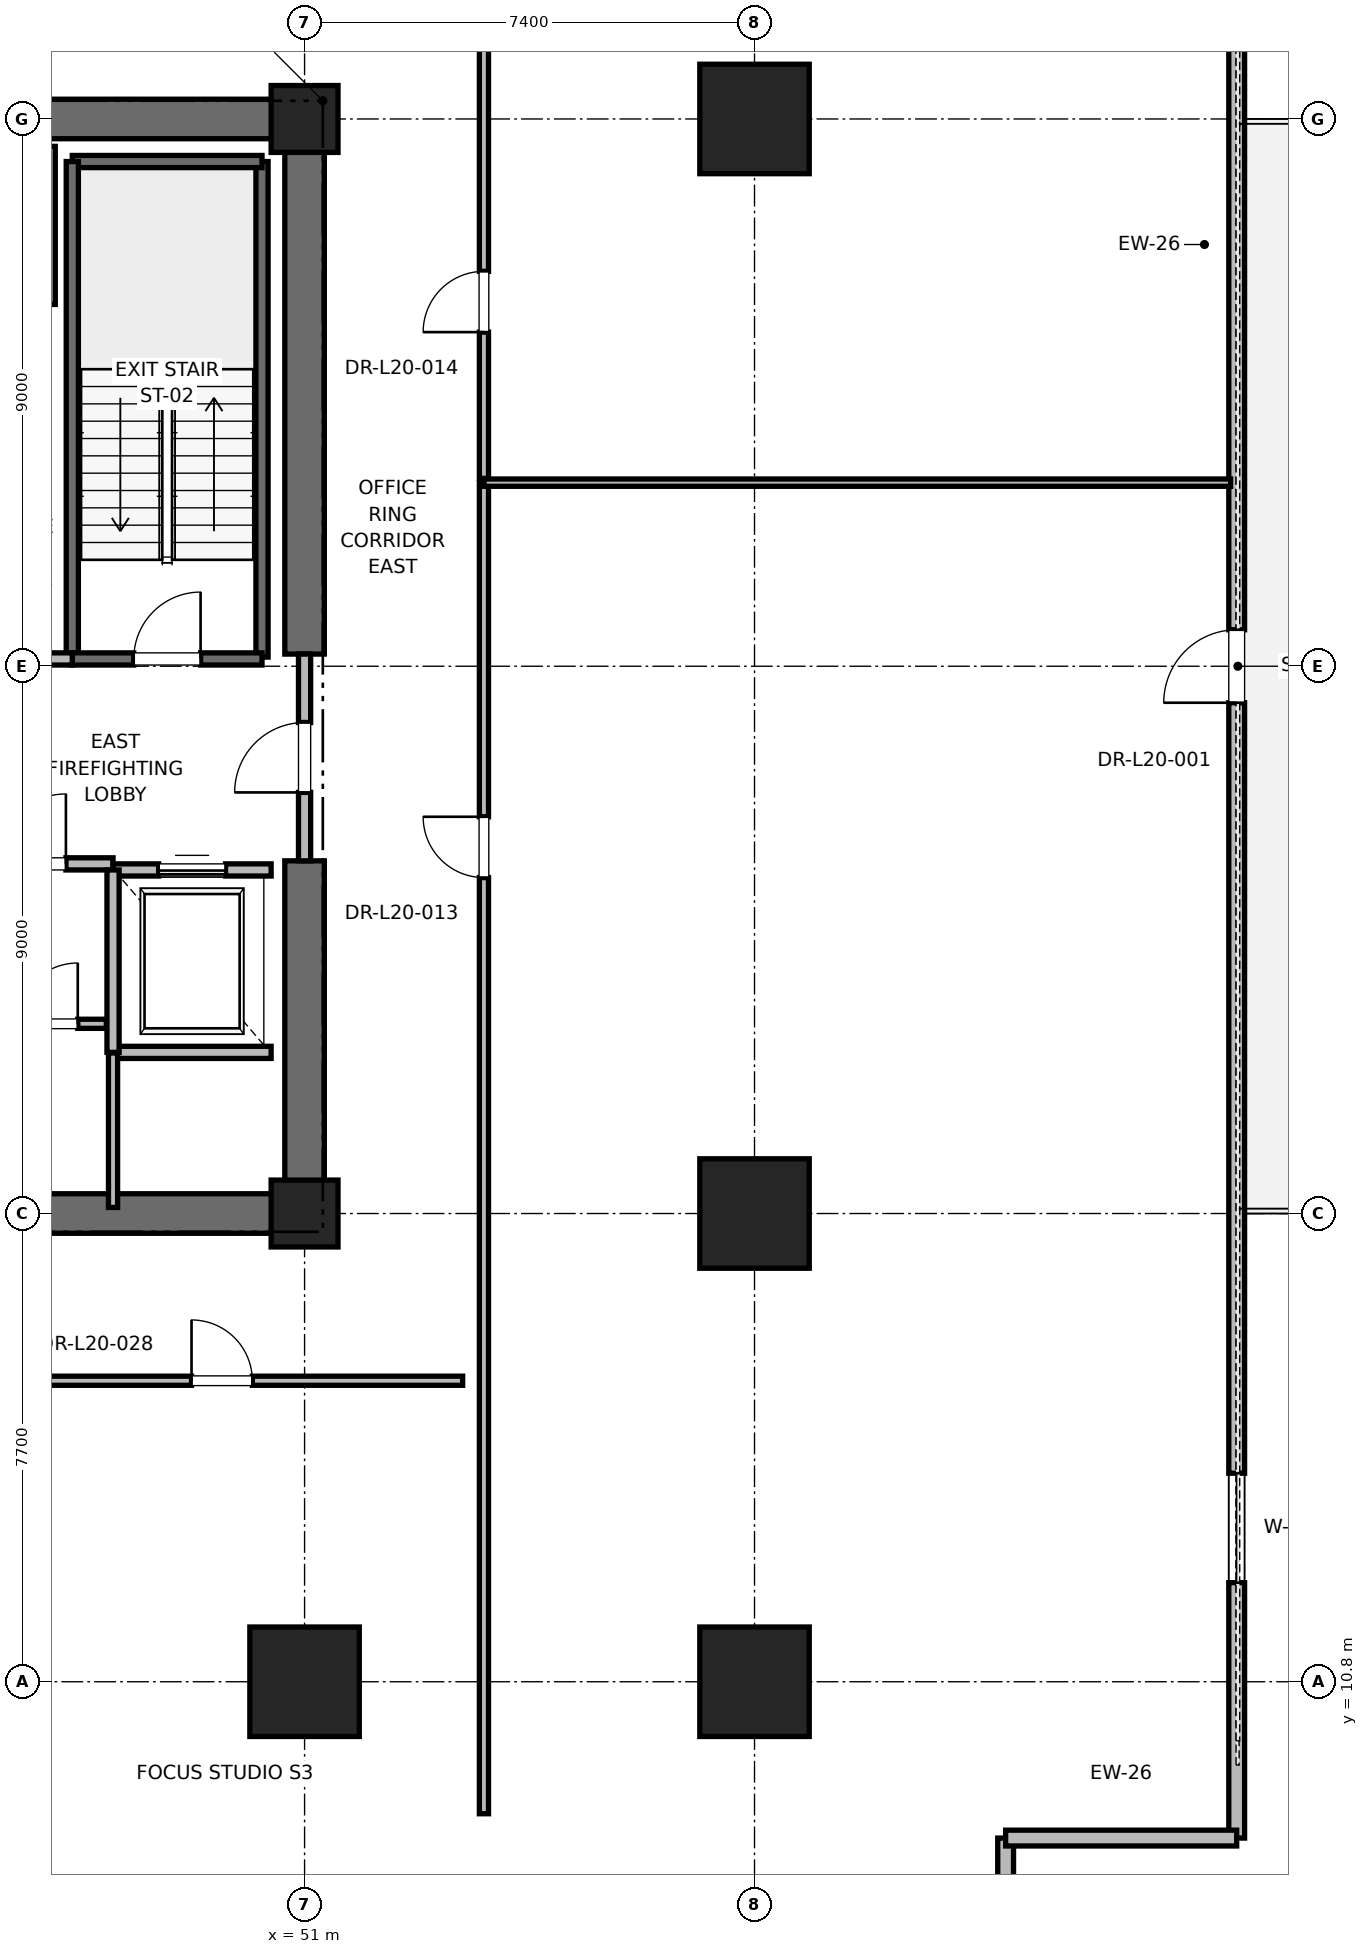
"""IFC4 building model, lengths in metres.
Left out: names, types, materials, properties, quantities, classifications, styles, units other than length and angle.
Written with IfcOpenShell. Run it as: python <this file> out.ifc"""

import sys

from ifc_helpers import new_model, si_unit, direction, frame, frame_2d, origin, origin_2d, place, context, subcontext, project, spatial, rectangle, extrude, element, fill, save


model = new_model("IFC4")
c1 = context("Model", 3, precision=1e-05, world=origin(), true_north=direction((0.0, 1.0)))
c2 = subcontext(c1, "Body", "Model", "MODEL_VIEW")
j1 = project(units=[si_unit("LENGTHUNIT", "METRE"), si_unit("PLANEANGLEUNIT", "RADIAN")], contexts=[c1])
p1 = place(None, origin())
s1 = spatial("IfcSite", under=j1, at=p1, CompositionType="ELEMENT")
p2 = place(p1, origin())
s2 = spatial("IfcBuilding", under=s1, at=p2, CompositionType="ELEMENT")
p3 = place(p2, frame((0.0, 0.0, 87.6)))
s3 = spatial("IfcBuildingStorey", under=s2, at=p3, CompositionType="ELEMENT", Elevation=87.6)
for number, where, z_axis, x_axis in (
    (1, (51.0, 10.8, 0.0), (0.0, 0.0, 1.0), (1.0, 0.0, 0.0)),
    (2, (58.4, 18.5, 0.0), (0.0, 0.0, 1.0), (1.0, 0.0, 0.0)),
    (3, (58.4, 36.5, 0.0), (0.0, 0.0, 1.0), (1.0, 0.0, 0.0)),
    (4, (58.4, 10.8, 0.0), (0.0, 0.0, 1.0), (1.0, 0.0, 0.0)),
):
    element("IfcColumn", number, at=place(p3, frame(where, z_axis=z_axis, x_axis=x_axis)), inside=s3, PredefinedType="COLUMN", context=c2, shape_type="SweptSolid", body=[
        extrude(rectangle(XDim=1.8, YDim=1.8, at=origin_2d()), origin(), (0.0, 0.0, 1.0), 4.0),
    ])
for number, where, z_axis, x_axis in (
    (5, (51.0, 18.5, 0.0), (0.0, 0.0, 1.0), (1.0, 0.0, 0.0)),
    (6, (51.0, 36.5, 0.0), (0.0, 0.0, 1.0), (1.0, 0.0, 0.0)),
):
    element("IfcColumn", number, at=place(p3, frame(where, z_axis=z_axis, x_axis=x_axis)), inside=s3, PredefinedType="PILASTER", context=c2, shape_type="SweptSolid", body=[
        extrude(rectangle(XDim=1.1, YDim=1.1, at=origin_2d()), origin(), (0.0, 0.0, 1.0), 4.0),
    ])
p4 = place(p3, frame((41.8, 18.5, 0.0), z_axis=(0.0, 0.0, 1.0), x_axis=(1.0, 0.0, 0.0)))
e7 = element("IfcWall", 7, at=p4, inside=s3, PredefinedType="SHEAR", context=c2, shape_type="SweptSolid", body=[
    extrude(rectangle(XDim=9.2, YDim=0.65, at=frame_2d((4.6, 0.0))), origin(), (0.0, 0.0, 1.0), 3.76),
])
for number, where, z_axis, x_axis in (
    (8, (45.2, 36.5, 0.0), (0.0, 0.0, 1.0), (1.0, 0.0, 0.0)),
    (9, (51.0, 18.5, 0.0), (0.0, 0.0, 1.0), (0.0, 1.0, 0.0)),
):
    element("IfcWall", number, at=place(p3, frame(where, z_axis=z_axis, x_axis=x_axis)), inside=s3, PredefinedType="SHEAR", context=c2, shape_type="SweptSolid", body=[
        extrude(rectangle(XDim=5.8, YDim=0.65, at=frame_2d((2.9, 0.0))), origin(), (0.0, 0.0, 1.0), 3.76),
    ])
p5 = place(p3, frame((51.0, 27.7, 0.0), z_axis=(0.0, 0.0, 1.0), x_axis=(0.0, 1.0, 0.0)))
e10 = element("IfcWall", 10, at=p5, inside=s3, PredefinedType="SHEAR", context=c2, shape_type="SweptSolid", body=[
    extrude(rectangle(XDim=8.8, YDim=0.65, at=frame_2d((4.4, 0.0))), origin(), (0.0, 0.0, 1.0), 3.76),
])
p6 = place(p3, frame((66.33, 8.229, 0.0), z_axis=(0.0, 0.0, 1.0), x_axis=(0.0, 1.0, 0.0)))
e11 = element("IfcWall", 11, at=p6, inside=s3, PredefinedType="PARAPET", context=c2, shape_type="SweptSolid", body=[
    extrude(rectangle(XDim=38.542, YDim=0.26, at=frame_2d((19.271, 0.0))), origin(), (0.0, 0.0, 1.0), 2.889),
])
p7 = place(p6, frame((4.2, 0.0, 0.85)))
e12 = element("IfcOpeningElement", 12, at=p7, cuts=e11, PredefinedType="OPENING", context=c2, shape_type="SweptSolid", body=[
    extrude(rectangle(XDim=1.8, YDim=2.2, at=frame_2d((0.9, 1.1))), frame((0.0, 0.13, 0.0), z_axis=(0.0, -1.0, 0.0), x_axis=(1.0, 0.0, 0.0)), (0.0, 0.0, 1.0), 0.26),
])
p8 = place(p6, frame((18.671, 0.0, 0.0)))
e13 = element("IfcOpeningElement", 13, at=p8, cuts=e11, PredefinedType="OPENING", context=c2, shape_type="SweptSolid", body=[
    extrude(rectangle(XDim=1.2, YDim=2.2, at=frame_2d((0.6, 1.1))), frame((0.0, 0.13, 0.0), z_axis=(0.0, -1.0, 0.0), x_axis=(1.0, 0.0, 0.0)), (0.0, 0.0, 1.0), 0.26),
])
p9 = place(p6, frame((32.542, 0.0, 0.85)))
e14 = element("IfcOpeningElement", 14, at=p9, cuts=e11, PredefinedType="OPENING", context=c2, shape_type="SweptSolid", body=[
    extrude(rectangle(XDim=1.8, YDim=2.2, at=frame_2d((0.9, 1.1))), frame((0.0, 0.13, 0.0), z_axis=(0.0, -1.0, 0.0), x_axis=(1.0, 0.0, 0.0)), (0.0, 0.0, 1.0), 0.26),
])
p10 = place(p3, frame((62.53, 4.829, 0.0), z_axis=(0.0, 0.0, 1.0), x_axis=(0.0, 1.0, 0.0)))
e15 = element("IfcWall", 15, at=p10, inside=s3, PredefinedType="PARAPET", context=c2, shape_type="SweptSolid", body=[
    extrude(rectangle(XDim=3.4, YDim=0.26, at=frame_2d((1.7, 0.0))), origin(), (0.0, 0.0, 1.0), 3.76),
])
p11 = place(p10, frame((0.8, 0.0, 0.85)))
e16 = element("IfcOpeningElement", 16, at=p11, cuts=e15, PredefinedType="OPENING", context=c2, shape_type="SweptSolid", body=[
    extrude(rectangle(XDim=1.8, YDim=2.2, at=frame_2d((0.9, 1.1))), frame((0.0, 0.13, 0.0), z_axis=(0.0, -1.0, 0.0), x_axis=(1.0, 0.0, 0.0)), (0.0, 0.0, 1.0), 0.26),
])
p12 = place(p3, frame((62.53, 8.229, 0.0), z_axis=(0.0, 0.0, 1.0), x_axis=(1.0, 0.0, 0.0)))
e17 = element("IfcWall", 17, at=p12, inside=s3, PredefinedType="PARAPET", context=c2, shape_type="SweptSolid", body=[
    extrude(rectangle(XDim=3.8, YDim=0.26, at=frame_2d((1.9, 0.0))), origin(), (0.0, 0.0, 1.0), 3.76),
])
p13 = place(p3, frame((50.3, 27.65, 0.0), z_axis=(0.0, 0.0, 1.0), x_axis=(0.0, 1.0, 0.0)))
e18 = element("IfcWall", 18, at=p13, inside=s3, PredefinedType="SOLIDWALL", context=c2, shape_type="SweptSolid", body=[
    extrude(rectangle(XDim=8.15, YDim=0.2, at=frame_2d((4.075, 0.0))), origin(), (0.0, 0.0, 1.0), 3.76),
])
p14 = place(p3, frame((47.18, 35.8, 0.0), z_axis=(0.0, 0.0, 1.0), x_axis=(1.0, 0.0, 0.0)))
e19 = element("IfcWall", 19, at=p14, inside=s3, PredefinedType="SOLIDWALL", context=c2, shape_type="SweptSolid", body=[
    extrude(rectangle(XDim=3.12, YDim=0.2, at=frame_2d((1.56, 0.0))), origin(), (0.0, 0.0, 1.0), 3.76),
])
p15 = place(p3, frame((47.18, 27.62, 0.0), z_axis=(0.0, 0.0, 1.0), x_axis=(0.0, 1.0, 0.0)))
e20 = element("IfcWall", 20, at=p15, inside=s3, PredefinedType="SOLIDWALL", context=c2, shape_type="SweptSolid", body=[
    extrude(rectangle(XDim=8.18, YDim=0.2, at=frame_2d((4.09, 0.0))), origin(), (0.0, 0.0, 1.0), 3.76),
])
p16 = place(p3, frame((47.18, 27.62, 0.0), z_axis=(0.0, 0.0, 1.0), x_axis=(1.0, 0.0, 0.0)))
e21 = element("IfcWall", 21, at=p16, inside=s3, PredefinedType="SOLIDWALL", context=c2, shape_type="SweptSolid", body=[
    extrude(rectangle(XDim=3.12, YDim=0.2, at=frame_2d((1.56, 0.0))), origin(), (0.0, 0.0, 1.0), 3.76),
])
p17 = place(p16, frame((1.01, 0.0, 0.0)))
e22 = element("IfcOpeningElement", 22, at=p17, cuts=e21, PredefinedType="OPENING", context=c2, shape_type="SweptSolid", body=[
    extrude(rectangle(XDim=1.1, YDim=2.15, at=frame_2d((0.55, 1.075))), frame((0.0, 0.1, 0.0), z_axis=(0.0, -1.0, 0.0), x_axis=(1.0, 0.0, 0.0)), (0.0, 0.0, 1.0), 0.2),
])
p18 = place(p3, frame((45.15, 24.25, 0.0), z_axis=(0.0, 0.0, 1.0), x_axis=(1.0, 0.0, 0.0)))
e23 = element("IfcWall", 23, at=p18, inside=s3, PredefinedType="PARTITIONING", context=c2, shape_type="SweptSolid", body=[
    extrude(rectangle(XDim=2.7, YDim=0.2, at=frame_2d((1.35, 0.0))), origin(), (0.0, 0.0, 1.0), 3.76),
])
p19 = place(p18, frame((0.775, 0.0, 0.0)))
e24 = element("IfcOpeningElement", 24, at=p19, cuts=e23, PredefinedType="OPENING", context=c2, shape_type="SweptSolid", body=[
    extrude(rectangle(XDim=1.15, YDim=2.2, at=frame_2d((0.575, 1.1))), frame((0.0, 0.1, 0.0), z_axis=(0.0, -1.0, 0.0), x_axis=(1.0, 0.0, 0.0)), (0.0, 0.0, 1.0), 0.2),
])
p20 = place(p3, frame((45.15, 27.62, 0.0), z_axis=(0.0, 0.0, 1.0), x_axis=(1.0, 0.0, 0.0)))
e25 = element("IfcWall", 25, at=p20, inside=s3, PredefinedType="PARTITIONING", context=c2, shape_type="SweptSolid", body=[
    extrude(rectangle(XDim=2.03, YDim=0.2, at=frame_2d((1.015, 0.0))), origin(), (0.0, 0.0, 1.0), 3.76),
])
p21 = place(p20, frame((0.44, 0.0, 0.0)))
e26 = element("IfcOpeningElement", 26, at=p21, cuts=e25, PredefinedType="OPENING", context=c2, shape_type="SweptSolid", body=[
    extrude(rectangle(XDim=1.15, YDim=2.2, at=frame_2d((0.575, 1.1))), frame((0.0, 0.1, 0.0), z_axis=(0.0, -1.0, 0.0), x_axis=(1.0, 0.0, 0.0)), (0.0, 0.0, 1.0), 0.2),
])
p22 = place(p3, frame((51.0, 24.3, 0.0), z_axis=(0.0, 0.0, 1.0), x_axis=(0.0, 1.0, 0.0)))
e27 = element("IfcWall", 27, at=p22, inside=s3, PredefinedType="PARTITIONING", context=c2, shape_type="SweptSolid", body=[
    extrude(rectangle(XDim=3.4, YDim=0.2, at=frame_2d((1.7, 0.0))), origin(), (0.0, 0.0, 1.0), 2.54),
])
p23 = place(p22, frame((1.125, 0.0, 0.0)))
e28 = element("IfcOpeningElement", 28, at=p23, cuts=e27, PredefinedType="OPENING", context=c2, shape_type="SweptSolid", body=[
    extrude(rectangle(XDim=1.15, YDim=2.2, at=frame_2d((0.575, 1.1))), frame((0.0, 0.1, 0.0), z_axis=(0.0, -1.0, 0.0), x_axis=(1.0, 0.0, 0.0)), (0.0, 0.0, 1.0), 0.2),
])
p24 = place(p3, frame((47.85, 21.15, 0.0), z_axis=(0.0, 0.0, 1.0), x_axis=(1.0, 0.0, 0.0)))
e29 = element("IfcWall", 29, at=p24, inside=s3, PredefinedType="SOLIDWALL", context=c2, shape_type="SweptSolid", body=[
    extrude(rectangle(XDim=2.6, YDim=0.2, at=frame_2d((1.3, 0.0))), origin(), (0.0, 0.0, 1.0), 3.76),
])
p25 = place(p3, frame((50.45, 24.15, 0.0), z_axis=(0.0, 0.0, 1.0), x_axis=(-1.0, 0.0, 0.0)))
e30 = element("IfcWall", 30, at=p25, inside=s3, PredefinedType="SOLIDWALL", context=c2, shape_type="SweptSolid", body=[
    extrude(rectangle(XDim=2.6, YDim=0.2, at=frame_2d((1.3, 0.0))), origin(), (0.0, 0.0, 1.0), 2.54),
])
p26 = place(p25, frame((0.75, 0.0, 0.0)))
e31 = element("IfcOpeningElement", 31, at=p26, cuts=e30, PredefinedType="OPENING", context=c2, shape_type="SweptSolid", body=[
    extrude(rectangle(XDim=1.1, YDim=2.2, at=frame_2d((0.55, 1.1))), frame((0.0, 0.1, 0.0), z_axis=(0.0, -1.0, 0.0), x_axis=(1.0, 0.0, 0.0)), (0.0, 0.0, 1.0), 0.2),
])
p27 = place(p3, frame((47.85, 24.15, 0.0), z_axis=(0.0, 0.0, 1.0), x_axis=(0.0, -1.0, 0.0)))
e32 = element("IfcWall", 32, at=p27, inside=s3, PredefinedType="SOLIDWALL", context=c2, shape_type="SweptSolid", body=[
    extrude(rectangle(XDim=3.0, YDim=0.2, at=frame_2d((1.5, 0.0))), origin(), (0.0, 0.0, 1.0), 3.76),
])
p28 = place(p3, frame((46.8, 33.45, 0.0), z_axis=(0.0, 0.0, 1.0), x_axis=(0.0, 1.0, 0.0)))
e33 = element("IfcWall", 33, at=p28, inside=s3, PredefinedType="SOLIDWALL", context=c2, shape_type="SweptSolid", body=[
    extrude(rectangle(XDim=2.6, YDim=0.2, at=frame_2d((1.3, 0.0))), origin(), (0.0, 0.0, 1.0), 3.76),
])
p29 = place(p3, frame((47.85, 18.6, 0.0), z_axis=(0.0, 0.0, 1.0), x_axis=(0.0, 1.0, 0.0)))
e34 = element("IfcWall", 34, at=p29, inside=s3, PredefinedType="PARTITIONING", context=c2, shape_type="SweptSolid", body=[
    extrude(rectangle(XDim=2.54, YDim=0.15, at=frame_2d((1.27, 0.0))), origin(), (0.0, 0.0, 1.0), 2.85),
])
p30 = place(p3, frame((45.8, 21.62, 0.0), z_axis=(0.0, 0.0, 1.0), x_axis=(1.0, 0.0, 0.0)))
e35 = element("IfcWall", 35, at=p30, inside=s3, PredefinedType="PARTITIONING", context=c2, shape_type="SweptSolid", body=[
    extrude(rectangle(XDim=1.94, YDim=0.15, at=frame_2d((0.97, 0.0))), origin(), (0.0, 0.0, 1.0), 2.85),
])
p31 = place(p30, frame((0.47, 0.0, 0.0)))
e36 = element("IfcOpeningElement", 36, at=p31, cuts=e35, PredefinedType="OPENING", context=c2, shape_type="SweptSolid", body=[
    extrude(rectangle(XDim=1.0, YDim=2.15, at=frame_2d((0.5, 1.075))), frame((0.0, 0.075, 0.0), z_axis=(0.0, -1.0, 0.0), x_axis=(1.0, 0.0, 0.0)), (0.0, 0.0, 1.0), 0.15),
])
p32 = place(p3, frame((45.782, 15.75, 0.0), z_axis=(0.0, 0.0, 1.0), x_axis=(1.0, 0.0, 0.0)))
e37 = element("IfcWall", 37, at=p32, inside=s3, PredefinedType="PARTITIONING", context=c2, shape_type="SweptSolid", body=[
    extrude(rectangle(XDim=7.818, YDim=0.15, at=frame_2d((3.909, 0.0))), origin(), (0.0, 0.0, 1.0), 2.85),
])
p33 = place(p32, frame((3.359, 0.0, 0.0)))
e38 = element("IfcOpeningElement", 38, at=p33, cuts=e37, PredefinedType="OPENING", context=c2, shape_type="SweptSolid", body=[
    extrude(rectangle(XDim=1.0, YDim=2.15, at=frame_2d((0.5, 1.075))), frame((0.0, 0.075, 0.0), z_axis=(0.0, -1.0, 0.0), x_axis=(1.0, 0.0, 0.0)), (0.0, 0.0, 1.0), 0.15),
])
p34 = place(p3, frame((53.95, 8.629, 0.0), z_axis=(0.0, 0.0, 1.0), x_axis=(0.0, 1.0, 0.0)))
e39 = element("IfcWall", 39, at=p34, inside=s3, PredefinedType="PARTITIONING", context=c2, shape_type="SweptSolid", body=[
    extrude(rectangle(XDim=21.89, YDim=0.15, at=frame_2d((10.945, 0.0))), origin(), (0.0, 0.0, 1.0), 2.85),
])
p35 = place(p34, frame((15.396, 0.0, 0.0)))
e40 = element("IfcOpeningElement", 40, at=p35, cuts=e39, PredefinedType="OPENING", context=c2, shape_type="SweptSolid", body=[
    extrude(rectangle(XDim=1.0, YDim=2.15, at=frame_2d((0.5, 1.075))), frame((0.0, 0.075, 0.0), z_axis=(0.0, -1.0, 0.0), x_axis=(1.0, 0.0, 0.0)), (0.0, 0.0, 1.0), 0.15),
])
p36 = place(p3, frame((53.95, 30.519, 0.0), z_axis=(0.0, 0.0, 1.0), x_axis=(1.0, 0.0, 0.0)))
e41 = element("IfcWall", 41, at=p36, inside=s3, PredefinedType="PARTITIONING", context=c2, shape_type="SweptSolid", body=[
    extrude(rectangle(XDim=12.28, YDim=0.12, at=frame_2d((6.14, 0.0))), origin(), (0.0, 0.0, 1.0), 2.85),
])
p37 = place(p3, frame((53.95, 30.589, 0.0), z_axis=(0.0, 0.0, 1.0), x_axis=(0.0, 1.0, 0.0)))
e42 = element("IfcWall", 42, at=p37, inside=s3, PredefinedType="PARTITIONING", context=c2, shape_type="SweptSolid", body=[
    extrude(rectangle(XDim=15.781, YDim=0.15, at=frame_2d((7.891, 0.0))), origin(), (0.0, 0.0, 1.0), 2.85),
])
p38 = place(p37, frame((2.405, 0.0, 0.0)))
e43 = element("IfcOpeningElement", 43, at=p38, cuts=e42, PredefinedType="OPENING", context=c2, shape_type="SweptSolid", body=[
    extrude(rectangle(XDim=1.0, YDim=2.15, at=frame_2d((0.5, 1.075))), frame((0.0, 0.075, 0.0), z_axis=(0.0, -1.0, 0.0), x_axis=(1.0, 0.0, 0.0)), (0.0, 0.0, 1.0), 0.15),
])
p39 = place(p7, origin())
e44 = element("IfcWindow", 44, at=p39, inside=s3, PartitioningType="SINGLE_PANEL", PredefinedType="WINDOW", context=c2, shape_type="SweptSolid", body=[
    extrude(rectangle(XDim=1.8, YDim=2.2, at=frame_2d((0.9, 1.1))), frame((0.0, 0.03, 0.0), z_axis=(0.0, -1.0, 0.0), x_axis=(1.0, 0.0, 0.0)), (0.0, 0.0, 1.0), 0.06),
])
fill(e12, e44)
p40 = place(p8, origin())
e45 = element("IfcDoor", 45, at=p40, inside=s3, OperationType="SINGLE_SWING_LEFT", PredefinedType="DOOR", context=c2, shape_type="SweptSolid", body=[
    extrude(rectangle(XDim=1.2, YDim=2.2, at=frame_2d((0.6, 1.1))), frame((0.0, 0.025, 0.0), z_axis=(0.0, -1.0, 0.0), x_axis=(1.0, 0.0, 0.0)), (0.0, 0.0, 1.0), 0.05),
])
fill(e13, e45)
p41 = place(p17, origin())
e46 = element("IfcDoor", 46, at=p41, inside=s3, OperationType="SINGLE_SWING_RIGHT", PredefinedType="DOOR", context=c2, shape_type="SweptSolid", body=[
    extrude(rectangle(XDim=1.1, YDim=2.15, at=frame_2d((0.55, 1.075))), frame((0.0, 0.025, 0.0), z_axis=(0.0, -1.0, 0.0), x_axis=(1.0, 0.0, 0.0)), (0.0, 0.0, 1.0), 0.05),
])
fill(e22, e46)
p42 = place(p19, origin())
e47 = element("IfcDoor", 47, at=p42, inside=s3, OperationType="SINGLE_SWING_RIGHT", PredefinedType="DOOR", context=c2, shape_type="SweptSolid", body=[
    extrude(rectangle(XDim=1.15, YDim=2.2, at=frame_2d((0.575, 1.1))), frame((0.0, 0.025, 0.0), z_axis=(0.0, -1.0, 0.0), x_axis=(1.0, 0.0, 0.0)), (0.0, 0.0, 1.0), 0.05),
])
fill(e24, e47)
p43 = place(p23, origin())
e48 = element("IfcDoor", 48, at=p43, inside=s3, OperationType="SINGLE_SWING_LEFT", PredefinedType="DOOR", context=c2, shape_type="SweptSolid", body=[
    extrude(rectangle(XDim=1.15, YDim=2.2, at=frame_2d((0.575, 1.1))), frame((0.0, 0.025, 0.0), z_axis=(0.0, -1.0, 0.0), x_axis=(1.0, 0.0, 0.0)), (0.0, 0.0, 1.0), 0.05),
])
fill(e28, e48)
p44 = place(p26, origin())
e49 = element("IfcDoor", 49, at=p44, inside=s3, OperationType="SLIDING_TO_RIGHT", PredefinedType="DOOR", context=c2, shape_type="SweptSolid", body=[
    extrude(rectangle(XDim=1.1, YDim=2.2, at=frame_2d((0.55, 1.1))), frame((0.0, 0.025, 0.0), z_axis=(0.0, -1.0, 0.0), x_axis=(1.0, 0.0, 0.0)), (0.0, 0.0, 1.0), 0.05),
])
fill(e31, e49)
p45 = place(p31, origin())
e50 = element("IfcDoor", 50, at=p45, inside=s3, OperationType="SINGLE_SWING_RIGHT", PredefinedType="DOOR", context=c2, shape_type="SweptSolid", body=[
    extrude(rectangle(XDim=1.0, YDim=2.15, at=frame_2d((0.5, 1.075))), frame((0.0, 0.025, 0.0), z_axis=(0.0, -1.0, 0.0), x_axis=(1.0, 0.0, 0.0)), (0.0, 0.0, 1.0), 0.05),
])
fill(e36, e50)
p46 = place(p33, origin())
e51 = element("IfcDoor", 51, at=p46, inside=s3, OperationType="SINGLE_SWING_LEFT", PredefinedType="DOOR", context=c2, shape_type="SweptSolid", body=[
    extrude(rectangle(XDim=1.0, YDim=2.15, at=frame_2d((0.5, 1.075))), frame((0.0, 0.025, 0.0), z_axis=(0.0, -1.0, 0.0), x_axis=(1.0, 0.0, 0.0)), (0.0, 0.0, 1.0), 0.05),
])
fill(e38, e51)
p47 = place(p35, origin())
e52 = element("IfcDoor", 52, at=p47, inside=s3, OperationType="SINGLE_SWING_RIGHT", PredefinedType="DOOR", context=c2, shape_type="SweptSolid", body=[
    extrude(rectangle(XDim=1.0, YDim=2.15, at=frame_2d((0.5, 1.075))), frame((0.0, 0.025, 0.0), z_axis=(0.0, -1.0, 0.0), x_axis=(1.0, 0.0, 0.0)), (0.0, 0.0, 1.0), 0.05),
])
fill(e40, e52)
p48 = place(p38, origin())
e53 = element("IfcDoor", 53, at=p48, inside=s3, OperationType="SINGLE_SWING_LEFT", PredefinedType="DOOR", context=c2, shape_type="SweptSolid", body=[
    extrude(rectangle(XDim=1.0, YDim=2.15, at=frame_2d((0.5, 1.075))), frame((0.0, 0.025, 0.0), z_axis=(0.0, -1.0, 0.0), x_axis=(1.0, 0.0, 0.0)), (0.0, 0.0, 1.0), 0.05),
])
fill(e43, e53)
save(model, sys.argv[1])
